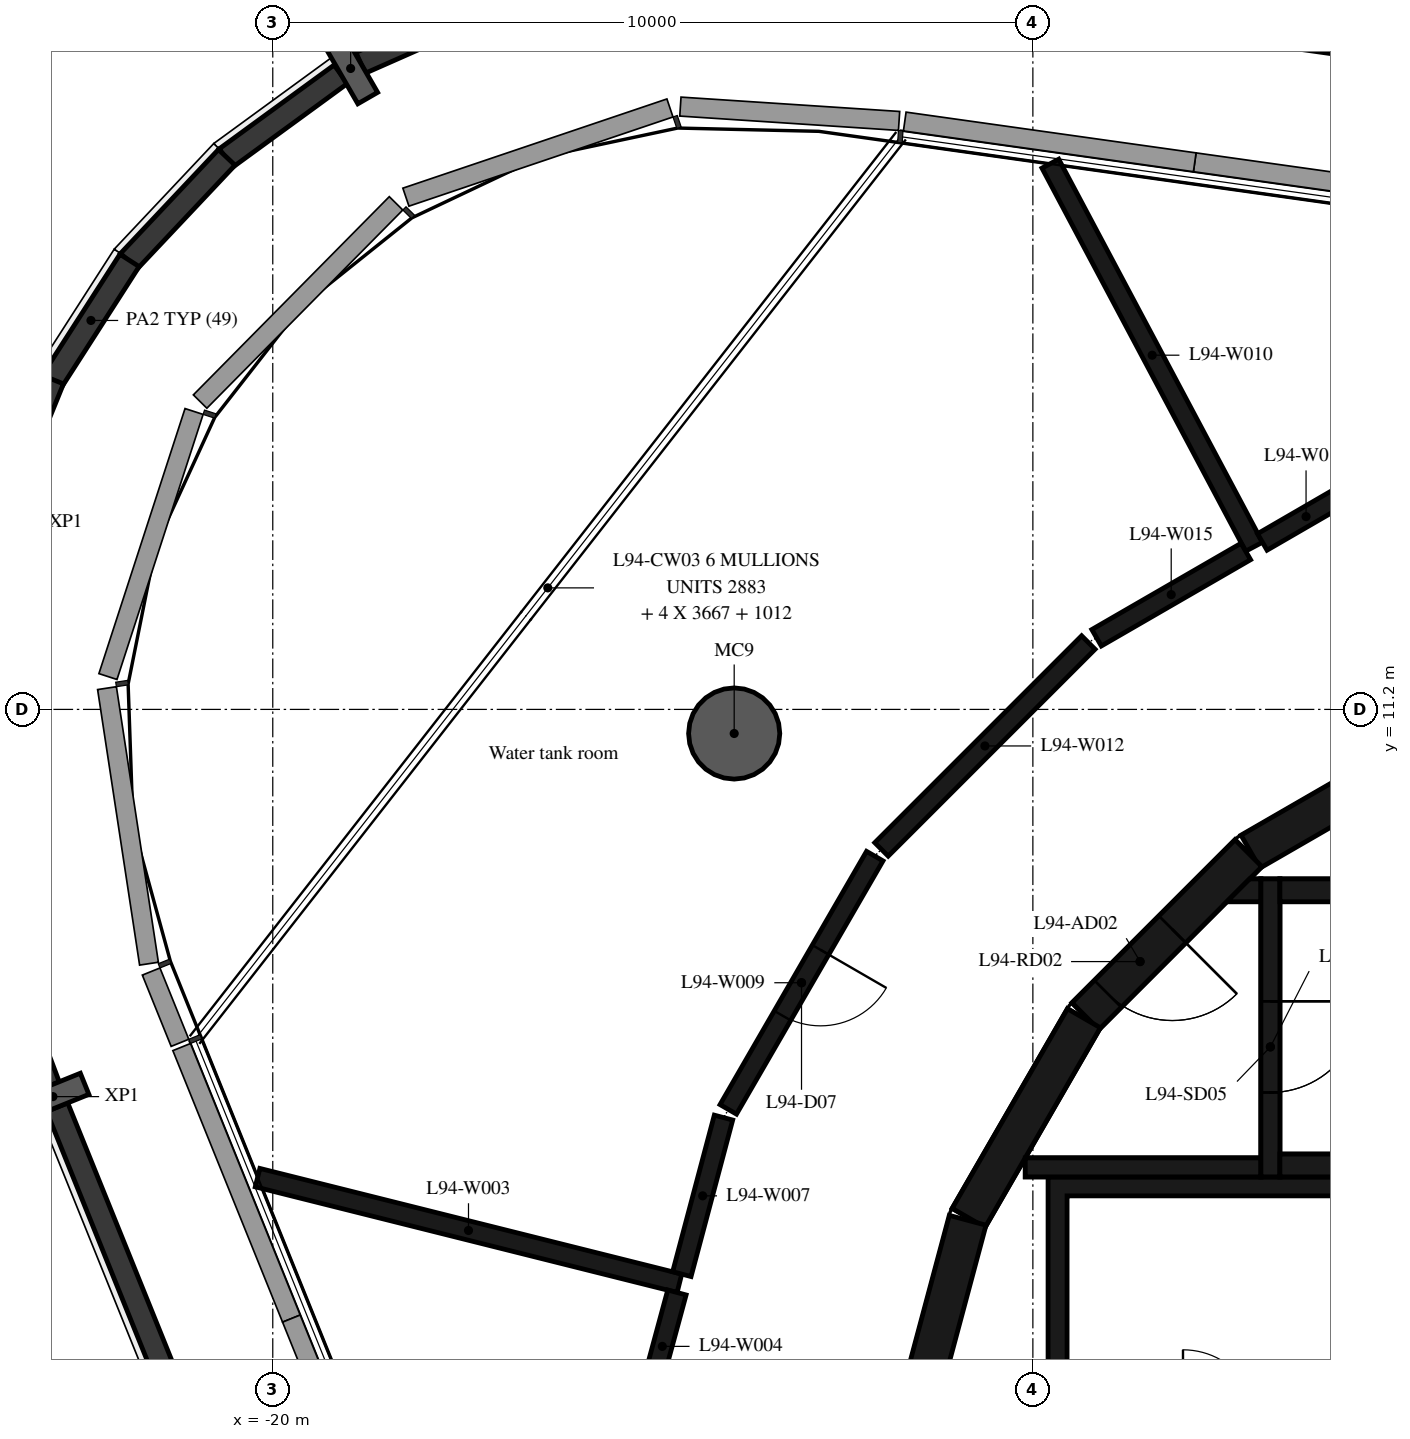
"""IFC4 building model, lengths in metres.
Left out: names, types, materials, properties, quantities, classifications, styles, units other than length and angle.
Written with IfcOpenShell. Run it as: python <this file> out.ifc"""

import sys

from ifc_helpers import new_model, si_unit, direction, frame, frame_2d, origin, origin_2d, place, context, subcontext, project, spatial, polyline, rectangle, hollow_circle, i_section, outline, extrude, element, fill, save


model = new_model("IFC4")
c1 = context("Model", 3, precision=1e-05, world=origin(), true_north=direction((0.0, 1.0)))
c2 = subcontext(c1, "Body", "Model", "MODEL_VIEW")
j1 = project(units=[si_unit("LENGTHUNIT", "METRE"), si_unit("PLANEANGLEUNIT", "RADIAN")], contexts=[c1])
p1 = place(None, origin())
s1 = spatial("IfcSite", under=j1, at=p1, CompositionType="ELEMENT")
p2 = place(p1, origin())
s2 = spatial("IfcBuilding", under=s1, at=p2, CompositionType="ELEMENT")
p3 = place(p2, frame((0.0, 0.0, 366.2)))
s3 = spatial("IfcBuildingStorey", under=s2, at=p3, CompositionType="ELEMENT", Elevation=366.2)
p4 = place(p3, frame((-13.929, 10.883, -0.38), z_axis=(0.0, 0.0, 1.0), x_axis=(1.0, 0.0, 0.0)))
e1 = element("IfcColumn", 1, at=p4, inside=s3, PredefinedType="COLUMN", context=c2, shape_type="SweptSolid", body=[
    extrude(hollow_circle(Radius=0.6, WallThickness=0.03, at=origin_2d()), origin(), (0.0, 0.0, 1.0), 5.54),
])
for number, where, z_axis, x_axis in (
    (2, (-18.976, 19.632, -0.38), (0.0, 0.0, 1.0), (0.866, 0.5, 0.0)),
    (3, (-22.893, 6.106, -0.38), (0.0, 0.0, 1.0), (-0.375, 0.927, 0.0)),
):
    element("IfcColumn", number, at=place(p3, frame(where, z_axis=z_axis, x_axis=x_axis)), inside=s3, PredefinedType="COLUMN", context=c2, shape_type="SweptSolid", body=[
        extrude(i_section(OverallWidth=0.3, OverallDepth=0.9, WebThickness=0.019, FlangeThickness=0.035, FilletRadius=0.03, at=origin_2d()), origin(), (0.0, 0.0, 1.0), 5.58),
    ])
p5 = place(p3, frame((-3.921, 19.676, 5.2), z_axis=(0.0, 0.0, 1.0), x_axis=(-0.990267426755, 0.139177668855, 0.0)))
e4 = element("IfcWall", 4, at=p5, inside=s3, PredefinedType="PARAPET", context=c2, shape_type="SweptSolid", body=[
    extrude(rectangle(XDim=7.466, YDim=0.3, at=frame_2d((3.733, 0.0))), origin(), (0.0, 0.0, 1.0), 0.58),
])
p6 = place(p3, frame((-17.134, 20.462, 5.2), z_axis=(0.0, 0.0, 1.0), x_axis=(-0.914734844425, -0.404054655206, 0.0)))
e5 = element("IfcWall", 5, at=p6, inside=s3, PredefinedType="PARAPET", context=c2, shape_type="SweptSolid", body=[
    extrude(rectangle(XDim=1.871, YDim=0.3, at=frame_2d((0.935, 0.0))), origin(), (0.0, 0.0, 1.0), 0.58),
])
p7 = place(p3, frame((-19.105, 19.556, 5.2), z_axis=(0.0, 0.0, 1.0), x_axis=(-0.8078094248, -0.589443748974, 0.0)))
e6 = element("IfcWall", 6, at=p7, inside=s3, PredefinedType="PARAPET", context=c2, shape_type="SweptSolid", body=[
    extrude(rectangle(XDim=1.87, YDim=0.3, at=frame_2d((0.935, 0.0))), origin(), (0.0, 0.0, 1.0), 0.58),
])
for number, where, z_axis, x_axis in (
    (7, (-20.606, 18.463, 5.2), (0.0, 0.0, 1.0), (-0.686, -0.728, 0.0)),
    (8, (-21.885, 17.107, 5.2), (0.0, 0.0, 1.0), (-0.54, -0.841, 0.0)),
):
    element("IfcWall", number, at=place(p3, frame(where, z_axis=z_axis, x_axis=x_axis)), inside=s3, PredefinedType="PARAPET", context=c2, shape_type="SweptSolid", body=[
        extrude(rectangle(XDim=1.878, YDim=0.3, at=frame_2d((0.939, 0.0))), origin(), (0.0, 0.0, 1.0), 0.58),
    ])
p8 = place(p3, frame((-22.893, 15.539, 5.2), z_axis=(0.0, 0.0, 1.0), x_axis=(-0.376538080043, -0.926401141125, 0.0)))
e9 = element("IfcWall", 9, at=p8, inside=s3, PredefinedType="PARAPET", context=c2, shape_type="SweptSolid", body=[
    extrude(rectangle(XDim=1.871, YDim=0.3, at=frame_2d((0.935, 0.0))), origin(), (0.0, 0.0, 1.0), 0.58),
])
p9 = place(p3, frame((-23.609, 7.996, 5.2), z_axis=(0.0, 0.0, 1.0), x_axis=(0.352581092229, -0.935781263652, 0.0)))
e10 = element("IfcWall", 10, at=p9, inside=s3, PredefinedType="PARAPET", context=c2, shape_type="SweptSolid", body=[
    extrude(rectangle(XDim=1.872, YDim=0.3, at=frame_2d((0.936, 0.0))), origin(), (0.0, 0.0, 1.0), 0.58),
])
p10 = place(p3, frame((-22.836, 5.967, 5.2), z_axis=(0.0, 0.0, 1.0), x_axis=(0.374607955373, -0.927183304299, 0.0)))
e11 = element("IfcWall", 11, at=p10, inside=s3, PredefinedType="PARAPET", context=c2, shape_type="SweptSolid", body=[
    extrude(rectangle(XDim=7.466, YDim=0.3, at=frame_2d((3.733, 0.0))), origin(), (0.0, 0.0, 1.0), 0.58),
])
p11 = place(p3, frame((-4.51, 10.845, 0.0), z_axis=(0.0, 0.0, 1.0), x_axis=(-0.865975092491, -0.500087131594, 0.0)))
e12 = element("IfcWall", 12, at=p11, inside=s3, PredefinedType="SHEAR", context=c2, shape_type="SweptSolid", body=[
    extrude(rectangle(XDim=3.033, YDim=0.5, at=frame_2d((1.516, 0.0))), origin(), (0.0, 0.0, 1.0), 4.8),
])
p12 = place(p3, frame((-7.164, 9.308, 0.0), z_axis=(0.0, 0.0, 1.0), x_axis=(-0.707106781187, -0.707106781187, 0.0)))
e13 = element("IfcWall", 13, at=p12, inside=s3, PredefinedType="SHEAR", context=c2, shape_type="SweptSolid", body=[
    extrude(rectangle(XDim=3.032, YDim=0.5, at=frame_2d((1.516, 0.0))), origin(), (0.0, 0.0, 1.0), 4.8),
])
p13 = place(p12, frame((1.416, 0.0, 0.0)))
e14 = element("IfcOpeningElement", 14, at=p13, cuts=e13, PredefinedType="OPENING", context=c2, shape_type="SweptSolid", body=[
    extrude(rectangle(XDim=1.2, YDim=2.1, at=frame_2d((0.6, 1.05))), frame((0.0, 0.26, 0.0), z_axis=(0.0, -1.0, 0.0), x_axis=(1.0, 0.0, 0.0)), (0.0, 0.0, 1.0), 0.52),
])
for number, where, z_axis, x_axis in (
    (15, (-9.329, 7.137, 0.0), (0.0, 0.0, 1.0), (-0.5, -0.866, 0.0)),
    (16, (-10.858, 4.479, 0.0), (0.0, 0.0, 1.0), (-0.259, -0.966, 0.0)),
):
    element("IfcWall", number, at=place(p3, frame(where, z_axis=z_axis, x_axis=x_axis)), inside=s3, PredefinedType="SHEAR", context=c2, shape_type="SweptSolid", body=[
        extrude(rectangle(XDim=3.033, YDim=0.5, at=frame_2d((1.516, 0.0))), origin(), (0.0, 0.0, 1.0), 4.8),
    ])
for number, where, z_axis, x_axis in (
    (17, (-6.75, 5.2, 0.0), (0.0, 0.0, 1.0), (1.0, 0.0, 0.0)),
    (18, (-6.75, 8.82, 0.0), (0.0, 0.0, 1.0), (1.0, 0.0, 0.0)),
):
    element("IfcWall", number, at=place(p3, frame(where, z_axis=z_axis, x_axis=x_axis)), inside=s3, PredefinedType="SHEAR", context=c2, shape_type="SweptSolid", body=[
        extrude(rectangle(XDim=6.75, YDim=0.3, at=frame_2d((3.375, 0.0))), origin(), (0.0, 0.0, 1.0), 4.8),
    ])
p14 = place(p3, frame((-6.875, 8.97, 0.0), z_axis=(0.0, 0.0, 1.0), x_axis=(0.0, -1.0, 0.0)))
e19 = element("IfcWall", 19, at=p14, inside=s3, PredefinedType="SHEAR", context=c2, shape_type="SweptSolid", body=[
    extrude(rectangle(XDim=3.92, YDim=0.25, at=frame_2d((1.96, 0.0))), origin(), (0.0, 0.0, 1.0), 4.8),
])
p15 = place(p14, frame((1.61, 0.0, 0.0)))
e20 = element("IfcOpeningElement", 20, at=p15, cuts=e19, PredefinedType="OPENING", context=c2, shape_type="SweptSolid", body=[
    extrude(rectangle(XDim=1.2, YDim=2.1, at=frame_2d((0.6, 1.05))), frame((0.0, 0.135, 0.0), z_axis=(0.0, -1.0, 0.0), x_axis=(1.0, 0.0, 0.0)), (0.0, 0.0, 1.0), 0.27),
])
p16 = place(p3, frame((-7.0, 5.175, 0.0), z_axis=(0.0, 0.0, 1.0), x_axis=(-1.0, 0.0, 0.0)))
e21 = element("IfcWall", 21, at=p16, inside=s3, PredefinedType="SHEAR", context=c2, shape_type="SweptSolid", body=[
    extrude(rectangle(XDim=3.1, YDim=0.25, at=frame_2d((1.55, 0.0))), origin(), (0.0, 0.0, 1.0), 4.8),
])
p17 = place(p3, origin())
e22 = element("IfcWall", 22, at=p17, inside=s3, PredefinedType="SHEAR", context=c2, shape_type="SweptSolid", body=[
    extrude(outline(polyline([(-7.148, 8.97), (-7.0, 8.97), (-7.0, 8.67), (-7.448, 8.67), (-7.148, 8.97)])), origin(), (0.0, 0.0, 1.0), 4.8),
])
p18 = place(p3, origin())
e23 = element("IfcWall", 23, at=p18, inside=s3, PredefinedType="SHEAR", context=c2, shape_type="SweptSolid", body=[
    extrude(outline(polyline([(-9.8, 1.9), (-9.55, 1.9), (-9.55, 4.8), (-5.5, 4.8), (-5.5, 1.9), (-5.25, 1.9), (-5.25, 4.8), (3.1, 4.8), (3.1, 1.9), (3.35, 1.9), (3.35, 4.8), (5.25, 4.8), (5.25, 1.9), (5.5, 1.9), (5.5, 4.8), (7.4, 4.8), (7.4, 1.9), (7.65, 1.9), (7.65, 4.8), (9.55, 4.8), (9.55, 1.9), (9.8, 1.9), (9.8, 4.8), (9.8, 5.05), (-9.8, 5.05), (-9.8, 4.8), (-9.8, 1.9)])), origin(), (0.0, 0.0, 1.0), 4.8),
])
for number, where, z_axis, x_axis in (
    (24, (-6.75, 5.2, 5.2), (0.0, 0.0, 1.0), (1.0, 0.0, 0.0)),
    (25, (-6.75, 8.82, 5.2), (0.0, 0.0, 1.0), (1.0, 0.0, 0.0)),
):
    element("IfcWall", number, at=place(p3, frame(where, z_axis=z_axis, x_axis=x_axis)), inside=s3, PredefinedType="SHEAR", context=c2, shape_type="SweptSolid", body=[
        extrude(rectangle(XDim=6.75, YDim=0.3, at=frame_2d((3.375, 0.0))), origin(), (0.0, 0.0, 1.0), 2.8),
    ])
p19 = place(p3, frame((-6.875, 8.97, 5.2), z_axis=(0.0, 0.0, 1.0), x_axis=(0.0, -1.0, 0.0)))
e26 = element("IfcWall", 26, at=p19, inside=s3, PredefinedType="SHEAR", context=c2, shape_type="SweptSolid", body=[
    extrude(rectangle(XDim=3.92, YDim=0.25, at=frame_2d((1.96, 0.0))), origin(), (0.0, 0.0, 1.0), 2.8),
])
p20 = place(p19, frame((1.61, 0.0, 0.0)))
e27 = element("IfcOpeningElement", 27, at=p20, cuts=e26, PredefinedType="OPENING", context=c2, shape_type="SweptSolid", body=[
    extrude(rectangle(XDim=1.2, YDim=2.1, at=frame_2d((0.6, 1.05))), frame((0.0, 0.135, 0.0), z_axis=(0.0, -1.0, 0.0), x_axis=(1.0, 0.0, 0.0)), (0.0, 0.0, 1.0), 0.27),
])
p21 = place(p3, frame((-7.0, 5.175, 5.2), z_axis=(0.0, 0.0, 1.0), x_axis=(-1.0, 0.0, 0.0)))
e28 = element("IfcWall", 28, at=p21, inside=s3, PredefinedType="SHEAR", context=c2, shape_type="SweptSolid", body=[
    extrude(rectangle(XDim=3.1, YDim=0.25, at=frame_2d((1.55, 0.0))), origin(), (0.0, 0.0, 1.0), 2.8),
])
p22 = place(p3, frame((0.0, 0.0, 5.2)))
e29 = element("IfcWall", 29, at=p22, inside=s3, PredefinedType="SHEAR", context=c2, shape_type="SweptSolid", body=[
    extrude(outline(polyline([(-7.148, 8.97), (-7.0, 8.97), (-7.0, 8.67), (-7.448, 8.67), (-7.148, 8.97)])), origin(), (0.0, 0.0, 1.0), 2.8),
])
p23 = place(p3, frame((-9.329, 7.137, 5.2), z_axis=(0.0, 0.0, 1.0), x_axis=(-0.500087131594, -0.865975092491, 0.0)))
e30 = element("IfcWall", 30, at=p23, inside=s3, PredefinedType="SHEAR", context=c2, shape_type="SweptSolid", body=[
    extrude(rectangle(XDim=3.033, YDim=0.5, at=frame_2d((1.516, 0.0))), origin(), (0.0, 0.0, 1.0), 2.8),
])
p24 = place(p3, frame((-7.164, 9.308, 5.2), z_axis=(0.0, 0.0, 1.0), x_axis=(-0.707106781187, -0.707106781187, 0.0)))
e31 = element("IfcWall", 31, at=p24, inside=s3, PredefinedType="SHEAR", context=c2, shape_type="SweptSolid", body=[
    extrude(rectangle(XDim=3.032, YDim=0.5, at=frame_2d((1.516, 0.0))), origin(), (0.0, 0.0, 1.0), 2.8),
])
p25 = place(p24, frame((1.416, 0.0, 0.0)))
e32 = element("IfcOpeningElement", 32, at=p25, cuts=e31, PredefinedType="OPENING", context=c2, shape_type="SweptSolid", body=[
    extrude(rectangle(XDim=1.2, YDim=2.1, at=frame_2d((0.6, 1.05))), frame((0.0, 0.26, 0.0), z_axis=(0.0, -1.0, 0.0), x_axis=(1.0, 0.0, 0.0)), (0.0, 0.0, 1.0), 0.52),
])
p26 = place(p3, frame((-14.65, 3.65, 0.0), z_axis=(0.0, 0.0, 1.0), x_axis=(-0.970034472151, 0.242967328748, 0.0)))
e33 = element("IfcWall", 33, at=p26, inside=s3, PredefinedType="PARTITIONING", context=c2, shape_type="SweptSolid", body=[
    extrude(rectangle(XDim=5.721, YDim=0.25, at=frame_2d((2.861, 0.0))), origin(), (0.0, 0.0, 1.0), 4.8),
])
p27 = place(p3, frame((-14.683, 3.529, 0.0), z_axis=(0.0, 0.0, 1.0), x_axis=(-0.261753947787, -0.9651346387, 0.0)))
e34 = element("IfcWall", 34, at=p27, inside=s3, PredefinedType="PARTITIONING", context=c2, shape_type="SweptSolid", body=[
    extrude(rectangle(XDim=1.47, YDim=0.25, at=frame_2d((0.735, 0.0))), origin(), (0.0, 0.0, 1.0), 4.8),
])
p28 = place(p3, frame((-14.07, 5.83, 0.0), z_axis=(0.0, 0.0, 1.0), x_axis=(-0.25709213915, -0.9663868956, 0.0)))
e35 = element("IfcWall", 35, at=p28, inside=s3, PredefinedType="PARTITIONING", context=c2, shape_type="SweptSolid", body=[
    extrude(rectangle(XDim=2.131, YDim=0.25, at=frame_2d((1.065, 0.0))), origin(), (0.0, 0.0, 1.0), 4.8),
])
p29 = place(p3, frame((-12.08, 9.27, 0.0), z_axis=(0.0, 0.0, 1.0), x_axis=(-0.500708693508, -0.865615852585, 0.0)))
e36 = element("IfcWall", 36, at=p29, inside=s3, PredefinedType="PARTITIONING", context=c2, shape_type="SweptSolid", body=[
    extrude(rectangle(XDim=3.849, YDim=0.25, at=frame_2d((1.925, 0.0))), origin(), (0.0, 0.0, 1.0), 4.8),
])
p30 = place(p29, frame((1.425, 0.0, 0.0)))
e37 = element("IfcOpeningElement", 37, at=p30, cuts=e36, PredefinedType="OPENING", context=c2, shape_type="SweptSolid", body=[
    extrude(rectangle(XDim=1.0, YDim=2.1, at=frame_2d((0.5, 1.05))), frame((0.0, 0.135, 0.0), z_axis=(0.0, -1.0, 0.0), x_axis=(1.0, 0.0, 0.0)), (0.0, 0.0, 1.0), 0.27),
])
p31 = place(p3, frame((-9.77, 18.38, 0.0), z_axis=(0.0, 0.0, 1.0), x_axis=(0.469502312853, -0.882931242072, 0.0)))
e38 = element("IfcWall", 38, at=p31, inside=s3, PredefinedType="PARTITIONING", context=c2, shape_type="SweptSolid", body=[
    extrude(rectangle(XDim=5.708, YDim=0.25, at=frame_2d((2.854, 0.0))), origin(), (0.0, 0.0, 1.0), 4.8),
])
p32 = place(p3, frame((-9.27, 12.08, 0.0), z_axis=(0.0, 0.0, 1.0), x_axis=(-0.707106781187, -0.707106781187, 0.0)))
e39 = element("IfcWall", 39, at=p32, inside=s3, PredefinedType="PARTITIONING", context=c2, shape_type="SweptSolid", body=[
    extrude(rectangle(XDim=3.849, YDim=0.25, at=frame_2d((1.925, 0.0))), origin(), (0.0, 0.0, 1.0), 4.8),
])
p33 = place(p3, frame((-7.198, 13.277, 0.0), z_axis=(0.0, 0.0, 1.0), x_axis=(-0.865821548015, -0.500352922439, 0.0)))
e40 = element("IfcWall", 40, at=p33, inside=s3, PredefinedType="PARTITIONING", context=c2, shape_type="SweptSolid", body=[
    extrude(rectangle(XDim=2.268, YDim=0.25, at=frame_2d((1.134, 0.0))), origin(), (0.0, 0.0, 1.0), 4.8),
])
p34 = place(p3, frame((-5.83, 14.07, 0.0), z_axis=(0.0, 0.0, 1.0), x_axis=(-0.865225325987, -0.501383221968, 0.0)))
e41 = element("IfcWall", 41, at=p34, inside=s3, PredefinedType="PARTITIONING", context=c2, shape_type="SweptSolid", body=[
    extrude(rectangle(XDim=1.331, YDim=0.25, at=frame_2d((0.666, 0.0))), origin(), (0.0, 0.0, 1.0), 4.8),
])
p35 = place(p15, origin())
e42 = element("IfcDoor", 42, at=p35, inside=s3, OperationType="SINGLE_SWING_LEFT", PredefinedType="DOOR", context=c2, shape_type="SweptSolid", body=[
    extrude(rectangle(XDim=1.2, YDim=2.1, at=frame_2d((0.6, 1.05))), frame((0.0, 0.025, 0.0), z_axis=(0.0, -1.0, 0.0), x_axis=(1.0, 0.0, 0.0)), (0.0, 0.0, 1.0), 0.05),
])
fill(e20, e42)
p36 = place(p13, origin())
e43 = element("IfcDoor", 43, at=p36, inside=s3, OperationType="SINGLE_SWING_RIGHT", PredefinedType="DOOR", context=c2, shape_type="SweptSolid", body=[
    extrude(rectangle(XDim=1.2, YDim=2.1, at=frame_2d((0.6, 1.05))), frame((0.0, 0.025, 0.0), z_axis=(0.0, -1.0, 0.0), x_axis=(1.0, 0.0, 0.0)), (0.0, 0.0, 1.0), 0.05),
])
fill(e14, e43)
p37 = place(p20, origin())
e44 = element("IfcDoor", 44, at=p37, inside=s3, OperationType="SINGLE_SWING_RIGHT", PredefinedType="DOOR", context=c2, shape_type="SweptSolid", body=[
    extrude(rectangle(XDim=1.2, YDim=2.1, at=frame_2d((0.6, 1.05))), frame((0.0, 0.025, 0.0), z_axis=(0.0, -1.0, 0.0), x_axis=(1.0, 0.0, 0.0)), (0.0, 0.0, 1.0), 0.05),
])
fill(e27, e44)
p38 = place(p25, origin())
e45 = element("IfcDoor", 45, at=p38, inside=s3, OperationType="SINGLE_SWING_LEFT", PredefinedType="DOOR", context=c2, shape_type="SweptSolid", body=[
    extrude(rectangle(XDim=1.2, YDim=2.1, at=frame_2d((0.6, 1.05))), frame((0.0, 0.025, 0.0), z_axis=(0.0, -1.0, 0.0), x_axis=(1.0, 0.0, 0.0)), (0.0, 0.0, 1.0), 0.05),
])
fill(e32, e45)
p39 = place(p30, origin())
e46 = element("IfcDoor", 46, at=p39, inside=s3, OperationType="SINGLE_SWING_LEFT", PredefinedType="DOOR", context=c2, shape_type="SweptSolid", body=[
    extrude(rectangle(XDim=1.0, YDim=2.1, at=frame_2d((0.5, 1.05))), frame((0.0, 0.025, 0.0), z_axis=(0.0, -1.0, 0.0), x_axis=(1.0, 0.0, 0.0)), (0.0, 0.0, 1.0), 0.05),
])
fill(e37, e46)
save(model, sys.argv[1])
